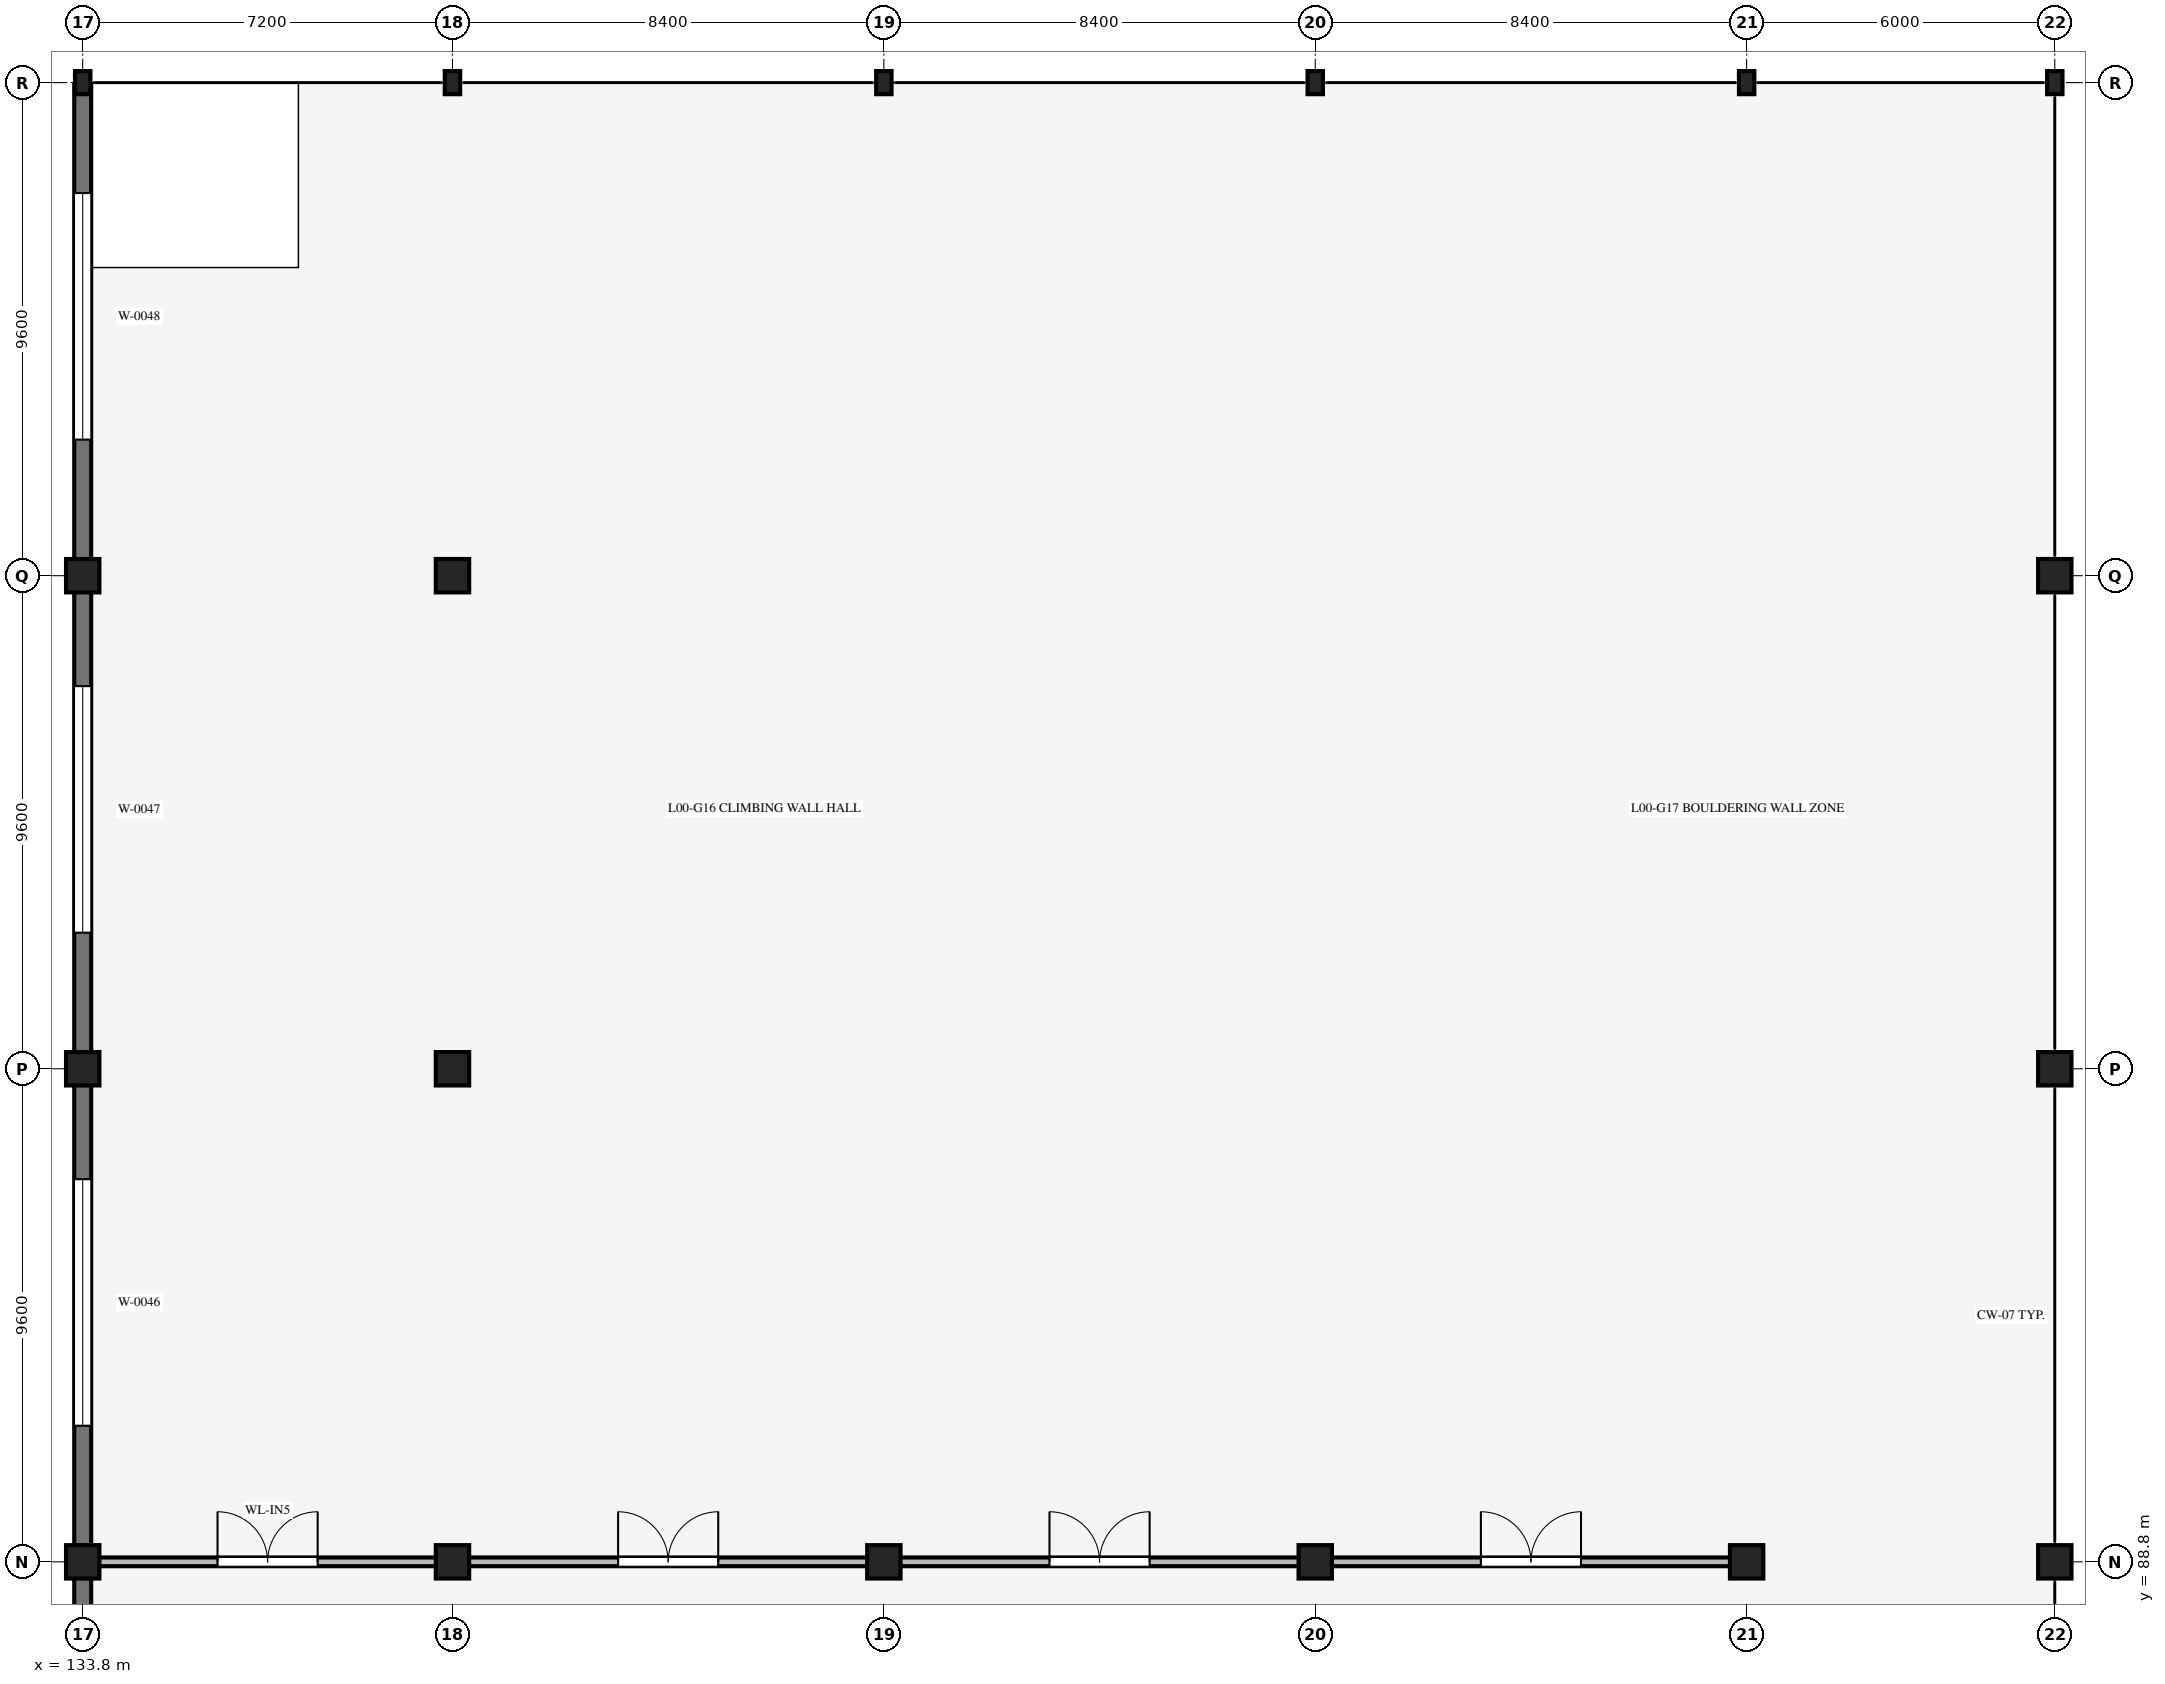
"""IFC4 building model, lengths in metres.
Left out: names, types, materials, properties, quantities, classifications, styles, units other than length and angle.
Written with IfcOpenShell. Run it as: python <this file> out.ifc"""

import sys

from ifc_helpers import new_model, si_unit, direction, frame, frame_2d, origin, origin_2d, place, context, subcontext, project, spatial, rectangle, i_section, extrude, element, fill, save


model = new_model("IFC4")
c1 = context("Model", 3, precision=1e-05, world=origin(), true_north=direction((0.0, 1.0)))
c2 = subcontext(c1, "Body", "Model", "MODEL_VIEW")
j1 = project(units=[si_unit("LENGTHUNIT", "METRE"), si_unit("PLANEANGLEUNIT", "RADIAN")], contexts=[c1])
p1 = place(None, origin())
s1 = spatial("IfcSite", under=j1, at=p1, CompositionType="ELEMENT")
p2 = place(p1, origin())
s2 = spatial("IfcBuilding", under=s1, at=p2, CompositionType="ELEMENT")
p3 = place(p2, origin())
s3 = spatial("IfcBuildingStorey", under=s2, at=p3, CompositionType="ELEMENT", Elevation=0.0)
for number, where, z_axis, x_axis in (
    (1, (133.8, 88.8, 0.0), (0.0, 0.0, 1.0), (1.0, 0.0, 0.0)),
    (2, (133.8, 98.4, 0.0), (0.0, 0.0, 1.0), (1.0, 0.0, 0.0)),
    (3, (133.8, 108.0, 0.0), (0.0, 0.0, 1.0), (1.0, 0.0, 0.0)),
):
    element("IfcColumn", number, at=place(p3, frame(where, z_axis=z_axis, x_axis=x_axis)), inside=s3, PredefinedType="COLUMN", context=c2, shape_type="SweptSolid", body=[
        extrude(rectangle(XDim=0.65, YDim=0.65, at=origin_2d()), origin(), (0.0, 0.0, 1.0), 6.0),
    ])
p4 = place(p3, frame((133.8, 117.6, 0.0), z_axis=(0.0, 0.0, 1.0), x_axis=(1.0, 0.0, 0.0)))
e4 = element("IfcColumn", 4, at=p4, inside=s3, PredefinedType="COLUMN", context=c2, shape_type="SweptSolid", body=[
    extrude(i_section(OverallWidth=0.3, OverallDepth=0.45, WebThickness=0.014, FlangeThickness=0.026, FilletRadius=0.027, at=origin_2d()), origin(), (0.0, 0.0, 1.0), 6.0),
])
for number, where, z_axis, x_axis in (
    (5, (141.0, 88.8, 0.0), (0.0, 0.0, 1.0), (1.0, 0.0, 0.0)),
    (6, (141.0, 98.4, 0.0), (0.0, 0.0, 1.0), (1.0, 0.0, 0.0)),
    (7, (141.0, 108.0, 0.0), (0.0, 0.0, 1.0), (1.0, 0.0, 0.0)),
):
    element("IfcColumn", number, at=place(p3, frame(where, z_axis=z_axis, x_axis=x_axis)), inside=s3, PredefinedType="COLUMN", context=c2, shape_type="SweptSolid", body=[
        extrude(rectangle(XDim=0.65, YDim=0.65, at=origin_2d()), origin(), (0.0, 0.0, 1.0), 6.0),
    ])
p5 = place(p3, frame((141.0, 117.6, 0.0), z_axis=(0.0, 0.0, 1.0), x_axis=(1.0, 0.0, 0.0)))
e8 = element("IfcColumn", 8, at=p5, inside=s3, PredefinedType="COLUMN", context=c2, shape_type="SweptSolid", body=[
    extrude(i_section(OverallWidth=0.3, OverallDepth=0.45, WebThickness=0.014, FlangeThickness=0.026, FilletRadius=0.027, at=origin_2d()), origin(), (0.0, 0.0, 1.0), 6.0),
])
p6 = place(p3, frame((149.4, 88.8, 0.0), z_axis=(0.0, 0.0, 1.0), x_axis=(1.0, 0.0, 0.0)))
e9 = element("IfcColumn", 9, at=p6, inside=s3, PredefinedType="COLUMN", context=c2, shape_type="SweptSolid", body=[
    extrude(rectangle(XDim=0.65, YDim=0.65, at=origin_2d()), origin(), (0.0, 0.0, 1.0), 6.0),
])
p7 = place(p3, frame((149.4, 117.6, 0.0), z_axis=(0.0, 0.0, 1.0), x_axis=(1.0, 0.0, 0.0)))
e10 = element("IfcColumn", 10, at=p7, inside=s3, PredefinedType="COLUMN", context=c2, shape_type="SweptSolid", body=[
    extrude(i_section(OverallWidth=0.3, OverallDepth=0.45, WebThickness=0.014, FlangeThickness=0.026, FilletRadius=0.027, at=origin_2d()), origin(), (0.0, 0.0, 1.0), 6.0),
])
p8 = place(p3, frame((157.8, 88.8, 0.0), z_axis=(0.0, 0.0, 1.0), x_axis=(1.0, 0.0, 0.0)))
e11 = element("IfcColumn", 11, at=p8, inside=s3, PredefinedType="COLUMN", context=c2, shape_type="SweptSolid", body=[
    extrude(rectangle(XDim=0.65, YDim=0.65, at=origin_2d()), origin(), (0.0, 0.0, 1.0), 6.0),
])
p9 = place(p3, frame((157.8, 117.6, 0.0), z_axis=(0.0, 0.0, 1.0), x_axis=(1.0, 0.0, 0.0)))
e12 = element("IfcColumn", 12, at=p9, inside=s3, PredefinedType="COLUMN", context=c2, shape_type="SweptSolid", body=[
    extrude(i_section(OverallWidth=0.3, OverallDepth=0.45, WebThickness=0.014, FlangeThickness=0.026, FilletRadius=0.027, at=origin_2d()), origin(), (0.0, 0.0, 1.0), 6.0),
])
p10 = place(p3, frame((166.2, 88.8, 0.0), z_axis=(0.0, 0.0, 1.0), x_axis=(1.0, 0.0, 0.0)))
e13 = element("IfcColumn", 13, at=p10, inside=s3, PredefinedType="COLUMN", context=c2, shape_type="SweptSolid", body=[
    extrude(rectangle(XDim=0.65, YDim=0.65, at=origin_2d()), origin(), (0.0, 0.0, 1.0), 6.0),
])
p11 = place(p3, frame((166.2, 117.6, 0.0), z_axis=(0.0, 0.0, 1.0), x_axis=(1.0, 0.0, 0.0)))
e14 = element("IfcColumn", 14, at=p11, inside=s3, PredefinedType="COLUMN", context=c2, shape_type="SweptSolid", body=[
    extrude(i_section(OverallWidth=0.3, OverallDepth=0.45, WebThickness=0.014, FlangeThickness=0.026, FilletRadius=0.027, at=origin_2d()), origin(), (0.0, 0.0, 1.0), 6.0),
])
for number, where, z_axis, x_axis in (
    (15, (172.2, 88.8, 0.0), (0.0, 0.0, 1.0), (1.0, 0.0, 0.0)),
    (16, (172.2, 98.4, 0.0), (0.0, 0.0, 1.0), (1.0, 0.0, 0.0)),
    (17, (172.2, 108.0, 0.0), (0.0, 0.0, 1.0), (1.0, 0.0, 0.0)),
):
    element("IfcColumn", number, at=place(p3, frame(where, z_axis=z_axis, x_axis=x_axis)), inside=s3, PredefinedType="COLUMN", context=c2, shape_type="SweptSolid", body=[
        extrude(rectangle(XDim=0.65, YDim=0.65, at=origin_2d()), origin(), (0.0, 0.0, 1.0), 6.0),
    ])
p12 = place(p3, frame((172.2, 117.6, 0.0), z_axis=(0.0, 0.0, 1.0), x_axis=(1.0, 0.0, 0.0)))
e18 = element("IfcColumn", 18, at=p12, inside=s3, PredefinedType="COLUMN", context=c2, shape_type="SweptSolid", body=[
    extrude(i_section(OverallWidth=0.3, OverallDepth=0.45, WebThickness=0.014, FlangeThickness=0.026, FilletRadius=0.027, at=origin_2d()), origin(), (0.0, 0.0, 1.0), 6.0),
])
p13 = place(p3, frame((133.8, 88.485, 0.0), z_axis=(0.0, 0.0, 1.0), x_axis=(0.0, -1.0, 0.0)))
e19 = element("IfcWall", 19, at=p13, inside=s3, PredefinedType="STANDARD", context=c2, shape_type="SweptSolid", body=[
    extrude(rectangle(XDim=7.795, YDim=0.33, at=frame_2d((3.897, 0.0))), origin(), (0.0, 0.0, 1.0), 16.0),
])
p14 = place(p13, frame((1.835, 0.0, 8.0)))
e20 = element("IfcOpeningElement", 20, at=p14, cuts=e19, PredefinedType="OPENING", context=c2, shape_type="SweptSolid", body=[
    extrude(rectangle(XDim=4.8, YDim=2.2, at=frame_2d((2.4, 1.1))), frame((0.0, 0.175, 0.0), z_axis=(0.0, -1.0, 0.0), x_axis=(1.0, 0.0, 0.0)), (0.0, 0.0, 1.0), 0.35),
])
p15 = place(p3, frame((133.8, 98.085, 0.0), z_axis=(0.0, 0.0, 1.0), x_axis=(0.0, -1.0, 0.0)))
e21 = element("IfcWall", 21, at=p15, inside=s3, PredefinedType="STANDARD", context=c2, shape_type="SweptSolid", body=[
    extrude(rectangle(XDim=8.97, YDim=0.33, at=frame_2d((4.485, 0.0))), origin(), (0.0, 0.0, 1.0), 16.0),
])
p16 = place(p15, frame((1.835, 0.0, 8.0)))
e22 = element("IfcOpeningElement", 22, at=p16, cuts=e21, PredefinedType="OPENING", context=c2, shape_type="SweptSolid", body=[
    extrude(rectangle(XDim=4.8, YDim=2.2, at=frame_2d((2.4, 1.1))), frame((0.0, 0.175, 0.0), z_axis=(0.0, -1.0, 0.0), x_axis=(1.0, 0.0, 0.0)), (0.0, 0.0, 1.0), 0.35),
])
p17 = place(p3, frame((133.8, 107.685, 0.0), z_axis=(0.0, 0.0, 1.0), x_axis=(0.0, -1.0, 0.0)))
e23 = element("IfcWall", 23, at=p17, inside=s3, PredefinedType="STANDARD", context=c2, shape_type="SweptSolid", body=[
    extrude(rectangle(XDim=8.97, YDim=0.33, at=frame_2d((4.485, 0.0))), origin(), (0.0, 0.0, 1.0), 16.0),
])
p18 = place(p17, frame((1.835, 0.0, 8.0)))
e24 = element("IfcOpeningElement", 24, at=p18, cuts=e23, PredefinedType="OPENING", context=c2, shape_type="SweptSolid", body=[
    extrude(rectangle(XDim=4.8, YDim=2.2, at=frame_2d((2.4, 1.1))), frame((0.0, 0.175, 0.0), z_axis=(0.0, -1.0, 0.0), x_axis=(1.0, 0.0, 0.0)), (0.0, 0.0, 1.0), 0.35),
])
p19 = place(p3, frame((133.8, 117.573, 0.0), z_axis=(0.0, 0.0, 1.0), x_axis=(0.0, -1.0, 0.0)))
e25 = element("IfcWall", 25, at=p19, inside=s3, PredefinedType="STANDARD", context=c2, shape_type="SweptSolid", body=[
    extrude(rectangle(XDim=9.258, YDim=0.33, at=frame_2d((4.629, 0.0))), origin(), (0.0, 0.0, 1.0), 16.0),
])
p20 = place(p19, frame((2.123, 0.0, 8.0)))
e26 = element("IfcOpeningElement", 26, at=p20, cuts=e25, PredefinedType="OPENING", context=c2, shape_type="SweptSolid", body=[
    extrude(rectangle(XDim=4.8, YDim=2.2, at=frame_2d((2.4, 1.1))), frame((0.0, 0.175, 0.0), z_axis=(0.0, -1.0, 0.0), x_axis=(1.0, 0.0, 0.0)), (0.0, 0.0, 1.0), 0.35),
])
p21 = place(p3, frame((134.1, 88.8, 0.0), z_axis=(0.0, 0.0, 1.0), x_axis=(1.0, 0.0, 0.0)))
e27 = element("IfcWall", 27, at=p21, inside=s3, PredefinedType="STANDARD", context=c2, shape_type="SweptSolid", body=[
    extrude(rectangle(XDim=6.6, YDim=0.17, at=frame_2d((3.3, 0.0))), origin(), (0.0, 0.0, 1.0), 3.05),
])
p22 = place(p21, frame((2.325, 0.0, 0.0)))
e28 = element("IfcOpeningElement", 28, at=p22, cuts=e27, PredefinedType="OPENING", context=c2, shape_type="SweptSolid", body=[
    extrude(rectangle(XDim=1.95, YDim=2.35, at=frame_2d((0.975, 1.175))), frame((0.0, 0.095, 0.0), z_axis=(0.0, -1.0, 0.0), x_axis=(1.0, 0.0, 0.0)), (0.0, 0.0, 1.0), 0.19),
])
p23 = place(p3, frame((141.3, 88.8, 0.0), z_axis=(0.0, 0.0, 1.0), x_axis=(1.0, 0.0, 0.0)))
e29 = element("IfcWall", 29, at=p23, inside=s3, PredefinedType="STANDARD", context=c2, shape_type="SweptSolid", body=[
    extrude(rectangle(XDim=7.8, YDim=0.17, at=frame_2d((3.9, 0.0))), origin(), (0.0, 0.0, 1.0), 3.05),
])
p24 = place(p23, frame((2.925, 0.0, 0.0)))
e30 = element("IfcOpeningElement", 30, at=p24, cuts=e29, PredefinedType="OPENING", context=c2, shape_type="SweptSolid", body=[
    extrude(rectangle(XDim=1.95, YDim=2.35, at=frame_2d((0.975, 1.175))), frame((0.0, 0.095, 0.0), z_axis=(0.0, -1.0, 0.0), x_axis=(1.0, 0.0, 0.0)), (0.0, 0.0, 1.0), 0.19),
])
p25 = place(p3, frame((149.7, 88.8, 0.0), z_axis=(0.0, 0.0, 1.0), x_axis=(1.0, 0.0, 0.0)))
e31 = element("IfcWall", 31, at=p25, inside=s3, PredefinedType="STANDARD", context=c2, shape_type="SweptSolid", body=[
    extrude(rectangle(XDim=7.8, YDim=0.17, at=frame_2d((3.9, 0.0))), origin(), (0.0, 0.0, 1.0), 3.05),
])
p26 = place(p25, frame((2.925, 0.0, 0.0)))
e32 = element("IfcOpeningElement", 32, at=p26, cuts=e31, PredefinedType="OPENING", context=c2, shape_type="SweptSolid", body=[
    extrude(rectangle(XDim=1.95, YDim=2.35, at=frame_2d((0.975, 1.175))), frame((0.0, 0.095, 0.0), z_axis=(0.0, -1.0, 0.0), x_axis=(1.0, 0.0, 0.0)), (0.0, 0.0, 1.0), 0.19),
])
p27 = place(p3, frame((158.1, 88.8, 0.0), z_axis=(0.0, 0.0, 1.0), x_axis=(1.0, 0.0, 0.0)))
e33 = element("IfcWall", 33, at=p27, inside=s3, PredefinedType="STANDARD", context=c2, shape_type="SweptSolid", body=[
    extrude(rectangle(XDim=7.8, YDim=0.17, at=frame_2d((3.9, 0.0))), origin(), (0.0, 0.0, 1.0), 3.05),
])
p28 = place(p27, frame((2.925, 0.0, 0.0)))
e34 = element("IfcOpeningElement", 34, at=p28, cuts=e33, PredefinedType="OPENING", context=c2, shape_type="SweptSolid", body=[
    extrude(rectangle(XDim=1.95, YDim=2.35, at=frame_2d((0.975, 1.175))), frame((0.0, 0.095, 0.0), z_axis=(0.0, -1.0, 0.0), x_axis=(1.0, 0.0, 0.0)), (0.0, 0.0, 1.0), 0.19),
])
p29 = place(p16, origin())
e35 = element("IfcWindow", 35, at=p29, inside=s3, PartitioningType="SINGLE_PANEL", PredefinedType="WINDOW", context=c2, shape_type="SweptSolid", body=[
    extrude(rectangle(XDim=4.8, YDim=2.2, at=frame_2d((2.4, 1.1))), frame((0.0, 0.03, 0.0), z_axis=(0.0, -1.0, 0.0), x_axis=(1.0, 0.0, 0.0)), (0.0, 0.0, 1.0), 0.06),
])
fill(e22, e35)
p30 = place(p18, origin())
e36 = element("IfcWindow", 36, at=p30, inside=s3, PartitioningType="SINGLE_PANEL", PredefinedType="WINDOW", context=c2, shape_type="SweptSolid", body=[
    extrude(rectangle(XDim=4.8, YDim=2.2, at=frame_2d((2.4, 1.1))), frame((0.0, 0.03, 0.0), z_axis=(0.0, -1.0, 0.0), x_axis=(1.0, 0.0, 0.0)), (0.0, 0.0, 1.0), 0.06),
])
fill(e24, e36)
p31 = place(p20, origin())
e37 = element("IfcWindow", 37, at=p31, inside=s3, PartitioningType="SINGLE_PANEL", PredefinedType="WINDOW", context=c2, shape_type="SweptSolid", body=[
    extrude(rectangle(XDim=4.8, YDim=2.2, at=frame_2d((2.4, 1.1))), frame((0.0, 0.03, 0.0), z_axis=(0.0, -1.0, 0.0), x_axis=(1.0, 0.0, 0.0)), (0.0, 0.0, 1.0), 0.06),
])
fill(e26, e37)
p32 = place(p22, origin())
e38 = element("IfcDoor", 38, at=p32, inside=s3, OperationType="DOUBLE_DOOR_SINGLE_SWING", PredefinedType="DOOR", context=c2, shape_type="SweptSolid", body=[
    extrude(rectangle(XDim=1.95, YDim=2.35, at=frame_2d((0.975, 1.175))), frame((0.0, 0.025, 0.0), z_axis=(0.0, -1.0, 0.0), x_axis=(1.0, 0.0, 0.0)), (0.0, 0.0, 1.0), 0.05),
])
fill(e28, e38)
p33 = place(p24, origin())
e39 = element("IfcDoor", 39, at=p33, inside=s3, OperationType="DOUBLE_DOOR_SINGLE_SWING", PredefinedType="DOOR", context=c2, shape_type="SweptSolid", body=[
    extrude(rectangle(XDim=1.95, YDim=2.35, at=frame_2d((0.975, 1.175))), frame((0.0, 0.025, 0.0), z_axis=(0.0, -1.0, 0.0), x_axis=(1.0, 0.0, 0.0)), (0.0, 0.0, 1.0), 0.05),
])
fill(e30, e39)
p34 = place(p26, origin())
e40 = element("IfcDoor", 40, at=p34, inside=s3, OperationType="DOUBLE_DOOR_SINGLE_SWING", PredefinedType="DOOR", context=c2, shape_type="SweptSolid", body=[
    extrude(rectangle(XDim=1.95, YDim=2.35, at=frame_2d((0.975, 1.175))), frame((0.0, 0.025, 0.0), z_axis=(0.0, -1.0, 0.0), x_axis=(1.0, 0.0, 0.0)), (0.0, 0.0, 1.0), 0.05),
])
fill(e32, e40)
p35 = place(p28, origin())
e41 = element("IfcDoor", 41, at=p35, inside=s3, OperationType="DOUBLE_DOOR_SINGLE_SWING", PredefinedType="DOOR", context=c2, shape_type="SweptSolid", body=[
    extrude(rectangle(XDim=1.95, YDim=2.35, at=frame_2d((0.975, 1.175))), frame((0.0, 0.025, 0.0), z_axis=(0.0, -1.0, 0.0), x_axis=(1.0, 0.0, 0.0)), (0.0, 0.0, 1.0), 0.05),
])
fill(e34, e41)
save(model, sys.argv[1])
